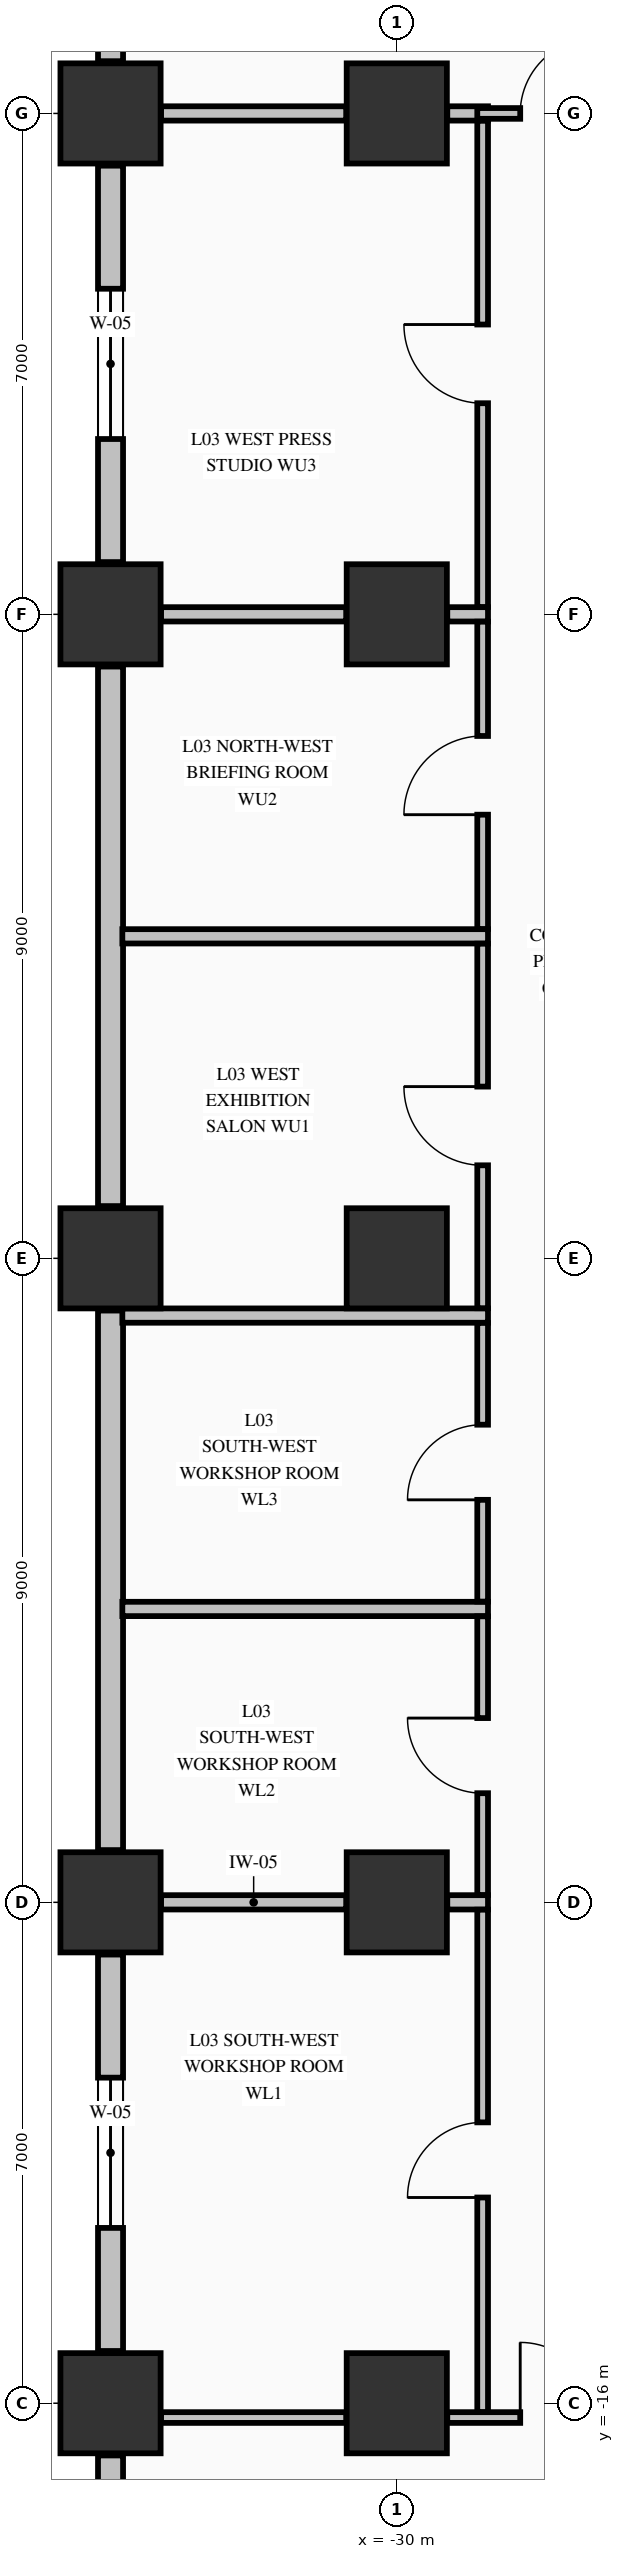
"""IFC4 building model, lengths in metres.
Left out: names, types, materials, properties, quantities, classifications, styles, units other than length and angle.
Written with IfcOpenShell. Run it as: python <this file> out.ifc"""

import sys

from ifc_helpers import new_model, si_unit, direction, frame, frame_2d, origin, origin_2d, place, context, subcontext, project, spatial, rectangle, extrude, element, fill, save


model = new_model("IFC4")
c1 = context("Model", 3, precision=1e-05, world=origin(), true_north=direction((0.0, 1.0)))
c2 = subcontext(c1, "Body", "Model", "MODEL_VIEW")
j1 = project(units=[si_unit("LENGTHUNIT", "METRE"), si_unit("PLANEANGLEUNIT", "RADIAN")], contexts=[c1])
p1 = place(None, origin())
s1 = spatial("IfcSite", under=j1, at=p1, CompositionType="ELEMENT")
p2 = place(p1, origin())
s2 = spatial("IfcBuilding", under=s1, at=p2, CompositionType="ELEMENT")
p3 = place(p2, frame((0.0, 0.0, 16.32)))
s3 = spatial("IfcBuildingStorey", under=s2, at=p3, CompositionType="ELEMENT", Elevation=16.32)
for number, where, z_axis, x_axis in (
    (1, (-34.0, -16.0, 0.0), (0.0, 0.0, 1.0), (1.0, 0.0, 0.0)),
    (2, (-34.0, -9.0, 0.0), (0.0, 0.0, 1.0), (1.0, 0.0, 0.0)),
    (3, (-34.0, 0.0, 0.0), (0.0, 0.0, 1.0), (1.0, 0.0, 0.0)),
    (4, (-34.0, 9.0, 0.0), (0.0, 0.0, 1.0), (1.0, 0.0, 0.0)),
    (5, (-34.0, 16.0, 0.0), (0.0, 0.0, 1.0), (1.0, 0.0, 0.0)),
    (6, (-30.0, -16.0, 0.0), (0.0, 0.0, 1.0), (1.0, 0.0, 0.0)),
    (7, (-30.0, -9.0, 0.0), (0.0, 0.0, 1.0), (1.0, 0.0, 0.0)),
    (8, (-30.0, 0.0, 0.0), (0.0, 0.0, 1.0), (1.0, 0.0, 0.0)),
    (9, (-30.0, 9.0, 0.0), (0.0, 0.0, 1.0), (1.0, 0.0, 0.0)),
    (10, (-30.0, 16.0, 0.0), (0.0, 0.0, 1.0), (1.0, 0.0, 0.0)),
):
    element("IfcColumn", number, at=place(p3, frame(where, z_axis=z_axis, x_axis=x_axis)), inside=s3, PredefinedType="COLUMN", context=c2, shape_type="SweptSolid", body=[
        extrude(rectangle(XDim=1.4, YDim=1.4, at=origin_2d()), origin(), (0.0, 0.0, 1.0), 4.99),
    ])
p4 = place(p3, frame((-34.0, -21.27, 0.0), z_axis=(0.0, 0.0, 1.0), x_axis=(0.0, 1.0, 0.0)))
e11 = element("IfcWall", 11, at=p4, inside=s3, PredefinedType="STANDARD", context=c2, shape_type="SweptSolid", body=[
    extrude(rectangle(XDim=4.54, YDim=0.35, at=frame_2d((2.27, 0.0))), origin(), (0.0, 0.0, 1.0), 4.99),
])
p5 = place(p3, frame((-34.0, -15.27, 0.0), z_axis=(0.0, 0.0, 1.0), x_axis=(0.0, 1.0, 0.0)))
e12 = element("IfcWall", 12, at=p5, inside=s3, PredefinedType="STANDARD", context=c2, shape_type="SweptSolid", body=[
    extrude(rectangle(XDim=5.54, YDim=0.35, at=frame_2d((2.77, 0.0))), origin(), (0.0, 0.0, 1.0), 3.332),
])
p6 = place(p5, frame((1.72, 0.0, 0.75)))
e13 = element("IfcOpeningElement", 13, at=p6, cuts=e12, PredefinedType="OPENING", context=c2, shape_type="SweptSolid", body=[
    extrude(rectangle(XDim=2.1, YDim=1.75, at=frame_2d((1.05, 0.875))), frame((0.0, 0.185, 0.0), z_axis=(0.0, -1.0, 0.0), x_axis=(1.0, 0.0, 0.0)), (0.0, 0.0, 1.0), 0.37),
])
for number, where, z_axis, x_axis in (
    (14, (-34.0, -8.27, 0.0), (0.0, 0.0, 1.0), (0.0, 1.0, 0.0)),
    (15, (-34.0, 0.73, 0.0), (0.0, 0.0, 1.0), (0.0, 1.0, 0.0)),
):
    element("IfcWall", number, at=place(p3, frame(where, z_axis=z_axis, x_axis=x_axis)), inside=s3, PredefinedType="STANDARD", context=c2, shape_type="SweptSolid", body=[
        extrude(rectangle(XDim=7.54, YDim=0.35, at=frame_2d((3.77, 0.0))), origin(), (0.0, 0.0, 1.0), 3.332),
    ])
p7 = place(p3, frame((-34.0, 9.73, 0.0), z_axis=(0.0, 0.0, 1.0), x_axis=(0.0, 1.0, 0.0)))
e16 = element("IfcWall", 16, at=p7, inside=s3, PredefinedType="STANDARD", context=c2, shape_type="SweptSolid", body=[
    extrude(rectangle(XDim=5.54, YDim=0.35, at=frame_2d((2.77, 0.0))), origin(), (0.0, 0.0, 1.0), 3.332),
])
p8 = place(p7, frame((1.72, 0.0, 0.75)))
e17 = element("IfcOpeningElement", 17, at=p8, cuts=e16, PredefinedType="OPENING", context=c2, shape_type="SweptSolid", body=[
    extrude(rectangle(XDim=2.1, YDim=1.75, at=frame_2d((1.05, 0.875))), frame((0.0, 0.185, 0.0), z_axis=(0.0, -1.0, 0.0), x_axis=(1.0, 0.0, 0.0)), (0.0, 0.0, 1.0), 0.37),
])
p9 = place(p3, frame((-34.0, 16.73, 0.0), z_axis=(0.0, 0.0, 1.0), x_axis=(0.0, 1.0, 0.0)))
e18 = element("IfcWall", 18, at=p9, inside=s3, PredefinedType="STANDARD", context=c2, shape_type="SweptSolid", body=[
    extrude(rectangle(XDim=4.54, YDim=0.35, at=frame_2d((2.27, 0.0))), origin(), (0.0, 0.0, 1.0), 3.332),
])
p10 = place(p3, frame((-33.294, -16.2, 0.0), z_axis=(0.0, 0.0, 1.0), x_axis=(1.0, 0.0, 0.0)))
e19 = element("IfcWall", 19, at=p10, inside=s3, PredefinedType="PARTITIONING", context=c2, shape_type="SweptSolid", body=[
    extrude(rectangle(XDim=2.588, YDim=0.15, at=frame_2d((1.294, 0.0))), origin(), (0.0, 0.0, 1.0), 3.332),
])
p11 = place(p3, frame((-29.294, -16.2, 0.0), z_axis=(0.0, 0.0, 1.0), x_axis=(1.0, 0.0, 0.0)))
e20 = element("IfcWall", 20, at=p11, inside=s3, PredefinedType="PARTITIONING", context=c2, shape_type="SweptSolid", body=[
    extrude(rectangle(XDim=2.588, YDim=0.15, at=frame_2d((1.294, 0.0))), origin(), (0.0, 0.0, 1.0), 3.332),
])
p12 = place(p11, frame((1.019, 0.0, 0.0)))
e21 = element("IfcOpeningElement", 21, at=p12, cuts=e20, PredefinedType="OPENING", context=c2, shape_type="SweptSolid", body=[
    extrude(rectangle(XDim=1.05, YDim=2.15, at=frame_2d((0.525, 1.075))), frame((0.0, 0.085, 0.0), z_axis=(0.0, -1.0, 0.0), x_axis=(1.0, 0.0, 0.0)), (0.0, 0.0, 1.0), 0.17),
])
p13 = place(p3, frame((-33.294, -9.0, 0.0), z_axis=(0.0, 0.0, 1.0), x_axis=(1.0, 0.0, 0.0)))
e22 = element("IfcWall", 22, at=p13, inside=s3, PredefinedType="PARTITIONING", context=c2, shape_type="SweptSolid", body=[
    extrude(rectangle(XDim=2.588, YDim=0.2, at=frame_2d((1.294, 0.0))), origin(), (0.0, 0.0, 1.0), 3.332),
])
p14 = place(p3, frame((-29.294, -9.0, 0.0), z_axis=(0.0, 0.0, 1.0), x_axis=(1.0, 0.0, 0.0)))
e23 = element("IfcWall", 23, at=p14, inside=s3, PredefinedType="PARTITIONING", context=c2, shape_type="SweptSolid", body=[
    extrude(rectangle(XDim=0.569, YDim=0.2, at=frame_2d((0.284, 0.0))), origin(), (0.0, 0.0, 1.0), 3.332),
])
for number, where, z_axis, x_axis in (
    (24, (-33.835, -4.9, 0.0), (0.0, 0.0, 1.0), (1.0, 0.0, 0.0)),
    (25, (-33.835, -0.8, 0.0), (0.0, 0.0, 1.0), (1.0, 0.0, 0.0)),
):
    element("IfcWall", number, at=place(p3, frame(where, z_axis=z_axis, x_axis=x_axis)), inside=s3, PredefinedType="PARTITIONING", context=c2, shape_type="SweptSolid", body=[
        extrude(rectangle(XDim=5.11, YDim=0.2, at=frame_2d((2.555, 0.0))), origin(), (0.0, 0.0, 1.0), 4.99),
    ])
p15 = place(p3, frame((-33.835, 4.5, 0.0), z_axis=(0.0, 0.0, 1.0), x_axis=(1.0, 0.0, 0.0)))
e26 = element("IfcWall", 26, at=p15, inside=s3, PredefinedType="PARTITIONING", context=c2, shape_type="SweptSolid", body=[
    extrude(rectangle(XDim=5.11, YDim=0.2, at=frame_2d((2.555, 0.0))), origin(), (0.0, 0.0, 1.0), 4.38),
])
p16 = place(p3, frame((-33.294, 9.0, 0.0), z_axis=(0.0, 0.0, 1.0), x_axis=(1.0, 0.0, 0.0)))
e27 = element("IfcWall", 27, at=p16, inside=s3, PredefinedType="PARTITIONING", context=c2, shape_type="SweptSolid", body=[
    extrude(rectangle(XDim=2.588, YDim=0.2, at=frame_2d((1.294, 0.0))), origin(), (0.0, 0.0, 1.0), 3.332),
])
p17 = place(p3, frame((-29.294, 9.0, 0.0), z_axis=(0.0, 0.0, 1.0), x_axis=(1.0, 0.0, 0.0)))
e28 = element("IfcWall", 28, at=p17, inside=s3, PredefinedType="PARTITIONING", context=c2, shape_type="SweptSolid", body=[
    extrude(rectangle(XDim=0.569, YDim=0.2, at=frame_2d((0.284, 0.0))), origin(), (0.0, 0.0, 1.0), 3.332),
])
p18 = place(p3, frame((-33.294, 16.0, 0.0), z_axis=(0.0, 0.0, 1.0), x_axis=(1.0, 0.0, 0.0)))
e29 = element("IfcWall", 29, at=p18, inside=s3, PredefinedType="PARTITIONING", context=c2, shape_type="SweptSolid", body=[
    extrude(rectangle(XDim=2.588, YDim=0.2, at=frame_2d((1.294, 0.0))), origin(), (0.0, 0.0, 1.0), 3.332),
])
p19 = place(p3, frame((-29.294, 16.0, 0.0), z_axis=(0.0, 0.0, 1.0), x_axis=(1.0, 0.0, 0.0)))
e30 = element("IfcWall", 30, at=p19, inside=s3, PredefinedType="PARTITIONING", context=c2, shape_type="SweptSolid", body=[
    extrude(rectangle(XDim=0.569, YDim=0.2, at=frame_2d((0.284, 0.0))), origin(), (0.0, 0.0, 1.0), 3.332),
])
p20 = place(p3, frame((-28.875, 16.0, 0.0), z_axis=(0.0, 0.0, 1.0), x_axis=(1.0, 0.0, 0.0)))
e31 = element("IfcWall", 31, at=p20, inside=s3, PredefinedType="PARTITIONING", context=c2, shape_type="SweptSolid", body=[
    extrude(rectangle(XDim=2.169, YDim=0.15, at=frame_2d((1.084, 0.0))), origin(), (0.0, 0.0, 1.0), 3.332),
])
p21 = place(p20, frame((0.6, 0.0, 0.0)))
e32 = element("IfcOpeningElement", 32, at=p21, cuts=e31, PredefinedType="OPENING", context=c2, shape_type="SweptSolid", body=[
    extrude(rectangle(XDim=1.05, YDim=2.15, at=frame_2d((0.525, 1.075))), frame((0.0, 0.085, 0.0), z_axis=(0.0, -1.0, 0.0), x_axis=(1.0, 0.0, 0.0)), (0.0, 0.0, 1.0), 0.17),
])
p22 = place(p3, frame((-28.8, -16.122, 0.0), z_axis=(0.0, 0.0, 1.0), x_axis=(0.0, 1.0, 0.0)))
e33 = element("IfcWall", 33, at=p22, inside=s3, PredefinedType="PARTITIONING", context=c2, shape_type="SweptSolid", body=[
    extrude(rectangle(XDim=7.019, YDim=0.15, at=frame_2d((3.51, 0.0))), origin(), (0.0, 0.0, 1.0), 4.99),
])
p23 = place(p22, frame((2.997, 0.0, 0.0)))
e34 = element("IfcOpeningElement", 34, at=p23, cuts=e33, PredefinedType="OPENING", context=c2, shape_type="SweptSolid", body=[
    extrude(rectangle(XDim=1.05, YDim=2.15, at=frame_2d((0.525, 1.075))), frame((0.0, 0.085, 0.0), z_axis=(0.0, -1.0, 0.0), x_axis=(1.0, 0.0, 0.0)), (0.0, 0.0, 1.0), 0.17),
])
p24 = place(p3, frame((-28.8, -8.897, 0.0), z_axis=(0.0, 0.0, 1.0), x_axis=(0.0, 1.0, 0.0)))
e35 = element("IfcWall", 35, at=p24, inside=s3, PredefinedType="PARTITIONING", context=c2, shape_type="SweptSolid", body=[
    extrude(rectangle(XDim=3.894, YDim=0.15, at=frame_2d((1.947, 0.0))), origin(), (0.0, 0.0, 1.0), 4.99),
])
p25 = place(p24, frame((1.422, 0.0, 0.0)))
e36 = element("IfcOpeningElement", 36, at=p25, cuts=e35, PredefinedType="OPENING", context=c2, shape_type="SweptSolid", body=[
    extrude(rectangle(XDim=1.05, YDim=2.15, at=frame_2d((0.525, 1.075))), frame((0.0, 0.085, 0.0), z_axis=(0.0, -1.0, 0.0), x_axis=(1.0, 0.0, 0.0)), (0.0, 0.0, 1.0), 0.17),
])
p26 = place(p3, frame((-28.8, -4.797, 0.0), z_axis=(0.0, 0.0, 1.0), x_axis=(0.0, 1.0, 0.0)))
e37 = element("IfcWall", 37, at=p26, inside=s3, PredefinedType="PARTITIONING", context=c2, shape_type="SweptSolid", body=[
    extrude(rectangle(XDim=3.894, YDim=0.15, at=frame_2d((1.947, 0.0))), origin(), (0.0, 0.0, 1.0), 4.99),
])
p27 = place(p26, frame((1.422, 0.0, 0.0)))
e38 = element("IfcOpeningElement", 38, at=p27, cuts=e37, PredefinedType="OPENING", context=c2, shape_type="SweptSolid", body=[
    extrude(rectangle(XDim=1.05, YDim=2.15, at=frame_2d((0.525, 1.075))), frame((0.0, 0.085, 0.0), z_axis=(0.0, -1.0, 0.0), x_axis=(1.0, 0.0, 0.0)), (0.0, 0.0, 1.0), 0.17),
])
p28 = place(p3, frame((-28.8, -0.697, 0.0), z_axis=(0.0, 0.0, 1.0), x_axis=(0.0, 1.0, 0.0)))
e39 = element("IfcWall", 39, at=p28, inside=s3, PredefinedType="PARTITIONING", context=c2, shape_type="SweptSolid", body=[
    extrude(rectangle(XDim=5.094, YDim=0.15, at=frame_2d((2.547, 0.0))), origin(), (0.0, 0.0, 1.0), 4.99),
])
p29 = place(p28, frame((1.997, 0.0, 0.0)))
e40 = element("IfcOpeningElement", 40, at=p29, cuts=e39, PredefinedType="OPENING", context=c2, shape_type="SweptSolid", body=[
    extrude(rectangle(XDim=1.1, YDim=2.15, at=frame_2d((0.55, 1.075))), frame((0.0, 0.085, 0.0), z_axis=(0.0, -1.0, 0.0), x_axis=(1.0, 0.0, 0.0)), (0.0, 0.0, 1.0), 0.17),
])
p30 = place(p3, frame((-28.8, 4.603, 0.0), z_axis=(0.0, 0.0, 1.0), x_axis=(0.0, 1.0, 0.0)))
e41 = element("IfcWall", 41, at=p30, inside=s3, PredefinedType="PARTITIONING", context=c2, shape_type="SweptSolid", body=[
    extrude(rectangle(XDim=4.294, YDim=0.15, at=frame_2d((2.147, 0.0))), origin(), (0.0, 0.0, 1.0), 4.99),
])
p31 = place(p30, frame((1.597, 0.0, 0.0)))
e42 = element("IfcOpeningElement", 42, at=p31, cuts=e41, PredefinedType="OPENING", context=c2, shape_type="SweptSolid", body=[
    extrude(rectangle(XDim=1.1, YDim=2.15, at=frame_2d((0.55, 1.075))), frame((0.0, 0.085, 0.0), z_axis=(0.0, -1.0, 0.0), x_axis=(1.0, 0.0, 0.0)), (0.0, 0.0, 1.0), 0.17),
])
p32 = place(p3, frame((-28.8, 9.103, 0.0), z_axis=(0.0, 0.0, 1.0), x_axis=(0.0, 1.0, 0.0)))
e43 = element("IfcWall", 43, at=p32, inside=s3, PredefinedType="PARTITIONING", context=c2, shape_type="SweptSolid", body=[
    extrude(rectangle(XDim=6.794, YDim=0.15, at=frame_2d((3.397, 0.0))), origin(), (0.0, 0.0, 1.0), 4.99),
])
p33 = place(p32, frame((2.847, 0.0, 0.0)))
e44 = element("IfcOpeningElement", 44, at=p33, cuts=e43, PredefinedType="OPENING", context=c2, shape_type="SweptSolid", body=[
    extrude(rectangle(XDim=1.1, YDim=2.15, at=frame_2d((0.55, 1.075))), frame((0.0, 0.085, 0.0), z_axis=(0.0, -1.0, 0.0), x_axis=(1.0, 0.0, 0.0)), (0.0, 0.0, 1.0), 0.17),
])
p34 = place(p6, origin())
e45 = element("IfcWindow", 45, at=p34, inside=s3, PartitioningType="SINGLE_PANEL", PredefinedType="WINDOW", context=c2, shape_type="SweptSolid", body=[
    extrude(rectangle(XDim=2.1, YDim=1.75, at=frame_2d((1.05, 0.875))), frame((0.0, 0.03, 0.0), z_axis=(0.0, -1.0, 0.0), x_axis=(1.0, 0.0, 0.0)), (0.0, 0.0, 1.0), 0.06),
])
fill(e13, e45)
p35 = place(p8, origin())
e46 = element("IfcWindow", 46, at=p35, inside=s3, PartitioningType="SINGLE_PANEL", PredefinedType="WINDOW", context=c2, shape_type="SweptSolid", body=[
    extrude(rectangle(XDim=2.1, YDim=1.75, at=frame_2d((1.05, 0.875))), frame((0.0, 0.03, 0.0), z_axis=(0.0, -1.0, 0.0), x_axis=(1.0, 0.0, 0.0)), (0.0, 0.0, 1.0), 0.06),
])
fill(e17, e46)
p36 = place(p12, origin())
e47 = element("IfcDoor", 47, at=p36, inside=s3, OperationType="SINGLE_SWING_LEFT", PredefinedType="DOOR", context=c2, shape_type="SweptSolid", body=[
    extrude(rectangle(XDim=1.05, YDim=2.15, at=frame_2d((0.525, 1.075))), frame((0.0, 0.025, 0.0), z_axis=(0.0, -1.0, 0.0), x_axis=(1.0, 0.0, 0.0)), (0.0, 0.0, 1.0), 0.05),
])
fill(e21, e47)
p37 = place(p21, origin())
e48 = element("IfcDoor", 48, at=p37, inside=s3, OperationType="SINGLE_SWING_RIGHT", PredefinedType="DOOR", context=c2, shape_type="SweptSolid", body=[
    extrude(rectangle(XDim=1.05, YDim=2.15, at=frame_2d((0.525, 1.075))), frame((0.0, 0.025, 0.0), z_axis=(0.0, -1.0, 0.0), x_axis=(1.0, 0.0, 0.0)), (0.0, 0.0, 1.0), 0.05),
])
fill(e32, e48)
p38 = place(p23, origin())
e49 = element("IfcDoor", 49, at=p38, inside=s3, OperationType="SINGLE_SWING_LEFT", PredefinedType="DOOR", context=c2, shape_type="SweptSolid", body=[
    extrude(rectangle(XDim=1.05, YDim=2.15, at=frame_2d((0.525, 1.075))), frame((0.0, 0.025, 0.0), z_axis=(0.0, -1.0, 0.0), x_axis=(1.0, 0.0, 0.0)), (0.0, 0.0, 1.0), 0.05),
])
fill(e34, e49)
p39 = place(p25, origin())
e50 = element("IfcDoor", 50, at=p39, inside=s3, OperationType="SINGLE_SWING_RIGHT", PredefinedType="DOOR", context=c2, shape_type="SweptSolid", body=[
    extrude(rectangle(XDim=1.05, YDim=2.15, at=frame_2d((0.525, 1.075))), frame((0.0, 0.025, 0.0), z_axis=(0.0, -1.0, 0.0), x_axis=(1.0, 0.0, 0.0)), (0.0, 0.0, 1.0), 0.05),
])
fill(e36, e50)
p40 = place(p27, origin())
e51 = element("IfcDoor", 51, at=p40, inside=s3, OperationType="SINGLE_SWING_LEFT", PredefinedType="DOOR", context=c2, shape_type="SweptSolid", body=[
    extrude(rectangle(XDim=1.05, YDim=2.15, at=frame_2d((0.525, 1.075))), frame((0.0, 0.025, 0.0), z_axis=(0.0, -1.0, 0.0), x_axis=(1.0, 0.0, 0.0)), (0.0, 0.0, 1.0), 0.05),
])
fill(e38, e51)
p41 = place(p29, origin())
e52 = element("IfcDoor", 52, at=p41, inside=s3, OperationType="SINGLE_SWING_RIGHT", PredefinedType="DOOR", context=c2, shape_type="SweptSolid", body=[
    extrude(rectangle(XDim=1.1, YDim=2.15, at=frame_2d((0.55, 1.075))), frame((0.0, 0.025, 0.0), z_axis=(0.0, -1.0, 0.0), x_axis=(1.0, 0.0, 0.0)), (0.0, 0.0, 1.0), 0.05),
])
fill(e40, e52)
p42 = place(p31, origin())
e53 = element("IfcDoor", 53, at=p42, inside=s3, OperationType="SINGLE_SWING_LEFT", PredefinedType="DOOR", context=c2, shape_type="SweptSolid", body=[
    extrude(rectangle(XDim=1.1, YDim=2.15, at=frame_2d((0.55, 1.075))), frame((0.0, 0.025, 0.0), z_axis=(0.0, -1.0, 0.0), x_axis=(1.0, 0.0, 0.0)), (0.0, 0.0, 1.0), 0.05),
])
fill(e42, e53)
p43 = place(p33, origin())
e54 = element("IfcDoor", 54, at=p43, inside=s3, OperationType="SINGLE_SWING_RIGHT", PredefinedType="DOOR", context=c2, shape_type="SweptSolid", body=[
    extrude(rectangle(XDim=1.1, YDim=2.15, at=frame_2d((0.55, 1.075))), frame((0.0, 0.025, 0.0), z_axis=(0.0, -1.0, 0.0), x_axis=(1.0, 0.0, 0.0)), (0.0, 0.0, 1.0), 0.05),
])
fill(e44, e54)
save(model, sys.argv[1])
